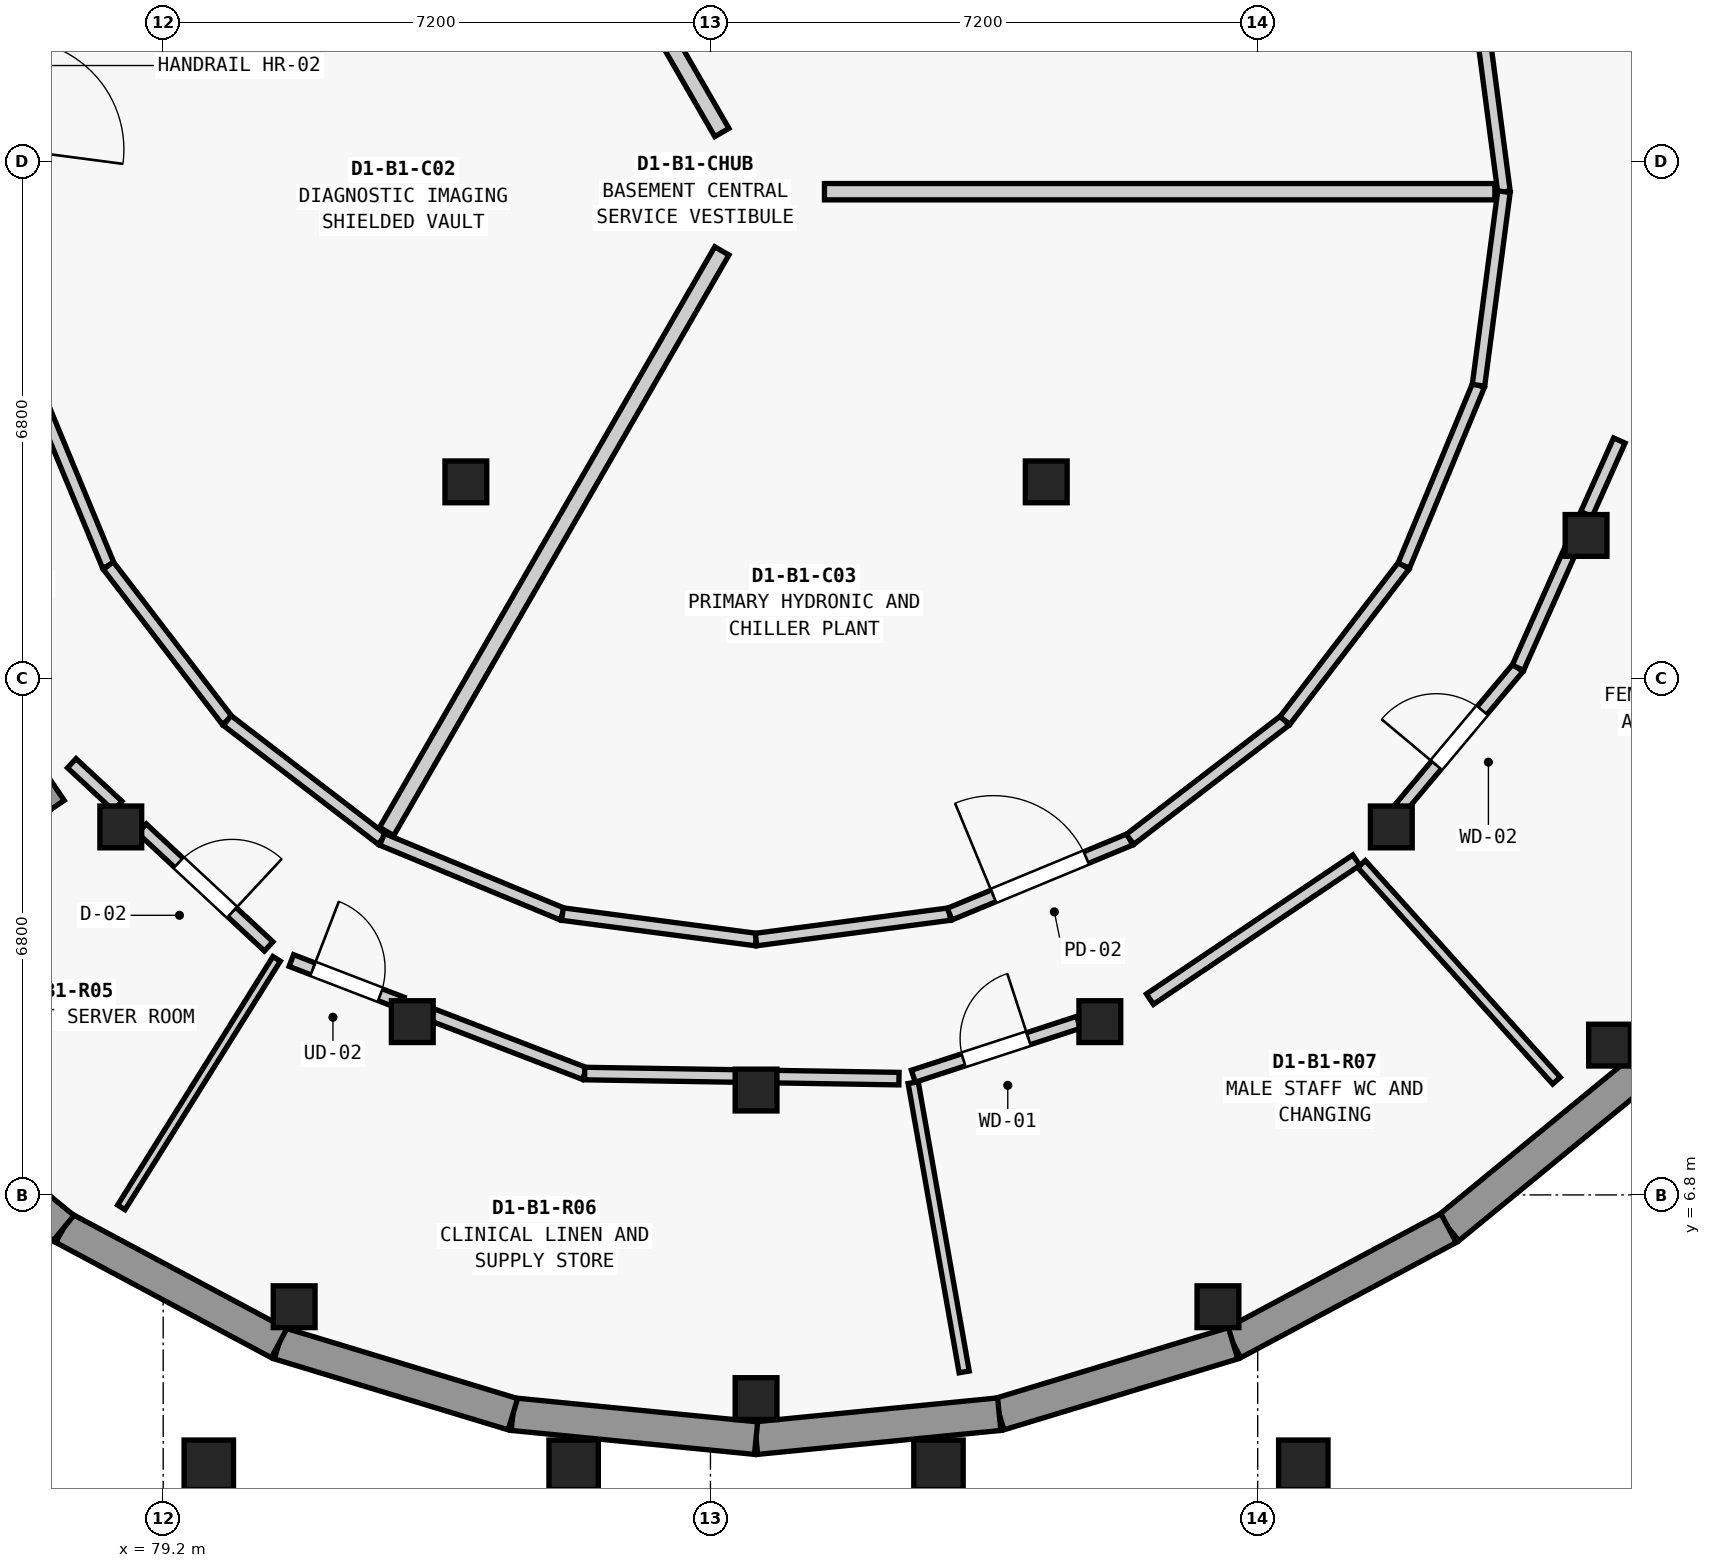
"""IFC4 building model, lengths in metres.
Left out: names, types, materials, properties, quantities, classifications, styles, units other than length and angle.
Written with IfcOpenShell. Run it as: python <this file> out.ifc"""

import sys

from ifc_helpers import new_model, si_unit, direction, frame, frame_2d, origin, origin_2d, place, context, subcontext, project, spatial, rectangle, extrude, element, fill, save


model = new_model("IFC4")
c1 = context("Model", 3, precision=1e-05, world=origin(), true_north=direction((0.0, 1.0)))
c2 = subcontext(c1, "Body", "Model", "MODEL_VIEW")
j1 = project(units=[si_unit("LENGTHUNIT", "METRE"), si_unit("PLANEANGLEUNIT", "RADIAN")], contexts=[c1])
p1 = place(None, origin())
s1 = spatial("IfcSite", under=j1, at=p1, CompositionType="ELEMENT")
p2 = place(p1, origin())
s2 = spatial("IfcBuilding", under=s1, at=p2, CompositionType="ELEMENT")
p3 = place(p2, frame((0.0, 0.0, -4.55)))
s3 = spatial("IfcBuildingStorey", under=s2, at=p3, CompositionType="ELEMENT", Elevation=-4.55)
for number, where, z_axis, x_axis in (
    (1, (80.923, 5.329, 0.0), (0.0, 0.0, 1.0), (1.0, 0.0, 0.0)),
    (2, (87.0, 4.12, 0.0), (0.0, 0.0, 1.0), (1.0, 0.0, 0.0)),
    (3, (93.077, 5.329, 0.0), (0.0, 0.0, 1.0), (1.0, 0.0, 0.0)),
    (4, (98.229, 8.771, 0.0), (0.0, 0.0, 1.0), (1.0, 0.0, 0.0)),
    (5, (78.642, 11.642, 0.0), (0.0, 0.0, 1.0), (1.0, 0.0, 0.0)),
    (6, (82.477, 9.08, 0.0), (0.0, 0.0, 1.0), (1.0, 0.0, 0.0)),
    (7, (87.0, 8.18, 0.0), (0.0, 0.0, 1.0), (1.0, 0.0, 0.0)),
    (8, (91.523, 9.08, 0.0), (0.0, 0.0, 1.0), (1.0, 0.0, 0.0)),
    (9, (95.358, 11.642, 0.0), (0.0, 0.0, 1.0), (1.0, 0.0, 0.0)),
    (10, (97.92, 15.477, 0.0), (0.0, 0.0, 1.0), (1.0, 0.0, 0.0)),
    (11, (83.182, 16.182, 0.0), (0.0, 0.0, 1.0), (1.0, 0.0, 0.0)),
    (12, (90.818, 16.182, 0.0), (0.0, 0.0, 1.0), (1.0, 0.0, 0.0)),
):
    element("IfcColumn", number, at=place(p3, frame(where, z_axis=z_axis, x_axis=x_axis)), inside=s3, PredefinedType="COLUMN", context=c2, shape_type="SweptSolid", body=[
        extrude(rectangle(XDim=0.55, YDim=0.55, at=origin_2d()), origin(), (0.0, 0.0, 1.0), 4.55),
    ])
for number, where, z_axis, x_axis in (
    (13, (79.8, 3.25, 0.0), (0.0, 0.0, 1.0), (1.0, 0.0, 0.0)),
    (14, (84.6, 3.25, 0.0), (0.0, 0.0, 1.0), (1.0, 0.0, 0.0)),
    (15, (89.4, 3.25, 0.0), (0.0, 0.0, 1.0), (1.0, 0.0, 0.0)),
    (16, (94.2, 3.25, 0.0), (0.0, 0.0, 1.0), (1.0, 0.0, 0.0)),
):
    element("IfcColumn", number, at=place(p3, frame(where, z_axis=z_axis, x_axis=x_axis)), inside=s3, PredefinedType="COLUMN", context=c2, shape_type="SweptSolid", body=[
        extrude(rectangle(XDim=0.65, YDim=0.65, at=origin_2d()), origin(), (0.0, 0.0, 1.0), 4.55),
    ])
for number, where, z_axis, x_axis in (
    (17, (100.636, 10.889, 0.0), (0.0, 0.0, 1.0), (-0.634, -0.773, 0.0)),
    (18, (98.597, 8.403, 0.0), (0.0, 0.0, 1.0), (-0.773, -0.634, 0.0)),
    (19, (96.111, 6.364, 0.0), (0.0, 0.0, 1.0), (-0.882, -0.472, 0.0)),
    (20, (93.276, 4.848, 0.0), (0.0, 0.0, 1.0), (-0.957, -0.29, 0.0)),
):
    element("IfcWall", number, at=place(p3, frame(where, z_axis=z_axis, x_axis=x_axis)), inside=s3, PredefinedType="USERDEFINED", context=c2, shape_type="SweptSolid", body=[
        extrude(rectangle(XDim=3.215, YDim=0.43, at=frame_2d((1.607, 0.0))), origin(), (0.0, 0.0, 1.0), 3.335),
    ])
for number, where, z_axis, x_axis in (
    (21, (90.199, 3.915, 0.0), (0.0, 0.0, 1.0), (-0.995, -0.098, 0.0)),
    (22, (87.0, 3.6, 0.0), (0.0, 0.0, 1.0), (-0.995, 0.098, 0.0)),
):
    element("IfcWall", number, at=place(p3, frame(where, z_axis=z_axis, x_axis=x_axis)), inside=s3, PredefinedType="USERDEFINED", context=c2, shape_type="SweptSolid", body=[
        extrude(rectangle(XDim=3.214, YDim=0.43, at=frame_2d((1.607, 0.0))), origin(), (0.0, 0.0, 1.0), 3.335),
    ])
for number, where, z_axis, x_axis in (
    (23, (83.801, 3.915, 0.0), (0.0, 0.0, 1.0), (-0.957, 0.29, 0.0)),
    (24, (80.724, 4.848, 0.0), (0.0, 0.0, 1.0), (-0.882, 0.472, 0.0)),
    (25, (77.889, 6.364, 0.0), (0.0, 0.0, 1.0), (-0.773, 0.634, 0.0)),
):
    element("IfcWall", number, at=place(p3, frame(where, z_axis=z_axis, x_axis=x_axis)), inside=s3, PredefinedType="USERDEFINED", context=c2, shape_type="SweptSolid", body=[
        extrude(rectangle(XDim=3.215, YDim=0.43, at=frame_2d((1.607, 0.0))), origin(), (0.0, 0.0, 1.0), 3.335),
    ])
p4 = place(p3, frame((77.804, 11.928, 0.0), z_axis=(0.0, 0.0, 1.0), x_axis=(-0.559054792443, 0.829130712883, 0.0)))
e26 = element("IfcWall", 26, at=p4, inside=s3, PredefinedType="SHEAR", context=c2, shape_type="SweptSolid", body=[
    extrude(rectangle(XDim=3.1, YDim=0.225, at=frame_2d((1.55, 0.0))), origin(), (0.0, 0.0, 1.0), 4.135),
])
p5 = place(p4, frame((0.9, 0.0, 0.0)))
e27 = element("IfcOpeningElement", 27, at=p5, cuts=e26, PredefinedType="OPENING", context=c2, shape_type="SweptSolid", body=[
    extrude(rectangle(XDim=1.3, YDim=2.2, at=frame_2d((0.65, 1.1))), frame((0.0, 0.123, 0.0), z_axis=(0.0, -1.0, 0.0), x_axis=(1.0, 0.0, 0.0)), (0.0, 0.0, 1.0), 0.245),
])
p6 = place(p3, frame((87.9, 20.0, 0.0), z_axis=(0.0, 0.0, 1.0), x_axis=(1.0, 0.0, 0.0)))
e28 = element("IfcWall", 28, at=p6, inside=s3, PredefinedType="SOLIDWALL", context=c2, shape_type="SweptSolid", body=[
    extrude(rectangle(XDim=8.82, YDim=0.215, at=frame_2d((4.41, 0.0))), origin(), (0.0, 0.0, 1.0), 2.76),
])
for number, where, z_axis, x_axis in (
    (29, (86.55, 20.779, 0.0), (0.0, 0.0, 1.0), (-0.5, 0.866, 0.0)),
    (30, (86.55, 19.221, 0.0), (0.0, 0.0, 1.0), (-0.5, -0.866, 0.0)),
):
    element("IfcWall", number, at=place(p3, frame(where, z_axis=z_axis, x_axis=x_axis)), inside=s3, PredefinedType="SOLIDWALL", context=c2, shape_type="SweptSolid", body=[
        extrude(rectangle(XDim=8.821, YDim=0.215, at=frame_2d((4.41, 0.0))), origin(), (0.0, 0.0, 1.0), 2.76),
    ])
p7 = place(p3, frame((96.84, 20.0, 0.0), z_axis=(0.0, 0.0, 1.0), x_axis=(-0.130476636685, 0.991451384224, 0.0)))
e31 = element("IfcWall", 31, at=p7, inside=s3, PredefinedType="PARTITIONING", context=c2, shape_type="SweptSolid", body=[
    extrude(rectangle(XDim=2.569, YDim=0.165, at=frame_2d((1.285, 0.0))), origin(), (0.0, 0.0, 1.0), 2.76),
])
p8 = place(p3, frame((77.495, 17.453, 0.0), z_axis=(0.0, 0.0, 1.0), x_axis=(0.382704397106, -0.923870848353, 0.0)))
e32 = element("IfcWall", 32, at=p8, inside=s3, PredefinedType="PARTITIONING", context=c2, shape_type="SweptSolid", body=[
    extrude(rectangle(XDim=2.568, YDim=0.165, at=frame_2d((1.284, 0.0))), origin(), (0.0, 0.0, 1.0), 2.76),
])
for number, where, z_axis, x_axis in (
    (33, (78.478, 15.08, 0.0), (0.0, 0.0, 1.0), (0.609, -0.793, 0.0)),
    (34, (80.042, 13.042, 0.0), (0.0, 0.0, 1.0), (0.793, -0.609, 0.0)),
):
    element("IfcWall", number, at=place(p3, frame(where, z_axis=z_axis, x_axis=x_axis)), inside=s3, PredefinedType="PARTITIONING", context=c2, shape_type="SweptSolid", body=[
        extrude(rectangle(XDim=2.569, YDim=0.165, at=frame_2d((1.285, 0.0))), origin(), (0.0, 0.0, 1.0), 2.76),
    ])
p9 = place(p3, frame((82.08, 11.478, 0.0), z_axis=(0.0, 0.0, 1.0), x_axis=(0.923870848353, -0.382704397106, 0.0)))
e35 = element("IfcWall", 35, at=p9, inside=s3, PredefinedType="PARTITIONING", context=c2, shape_type="SweptSolid", body=[
    extrude(rectangle(XDim=2.568, YDim=0.165, at=frame_2d((1.284, 0.0))), origin(), (0.0, 0.0, 1.0), 2.76),
])
for number, where, z_axis, x_axis in (
    (36, (84.453, 10.495, 0.0), (0.0, 0.0, 1.0), (0.991, -0.13, 0.0)),
    (37, (87.0, 10.16, 0.0), (0.0, 0.0, 1.0), (0.991, 0.13, 0.0)),
):
    element("IfcWall", number, at=place(p3, frame(where, z_axis=z_axis, x_axis=x_axis)), inside=s3, PredefinedType="PARTITIONING", context=c2, shape_type="SweptSolid", body=[
        extrude(rectangle(XDim=2.569, YDim=0.165, at=frame_2d((1.285, 0.0))), origin(), (0.0, 0.0, 1.0), 2.76),
    ])
p10 = place(p3, frame((89.547, 10.495, 0.0), z_axis=(0.0, 0.0, 1.0), x_axis=(0.923870848353, 0.382704397106, 0.0)))
e38 = element("IfcWall", 38, at=p10, inside=s3, PredefinedType="PARTITIONING", context=c2, shape_type="SweptSolid", body=[
    extrude(rectangle(XDim=2.568, YDim=0.165, at=frame_2d((1.284, 0.0))), origin(), (0.0, 0.0, 1.0), 2.76),
])
p11 = place(p10, frame((0.624, 0.0, 0.0)))
e39 = element("IfcOpeningElement", 39, at=p11, cuts=e38, PredefinedType="OPENING", context=c2, shape_type="SweptSolid", body=[
    extrude(rectangle(XDim=1.32, YDim=2.24, at=frame_2d((0.66, 1.12))), frame((0.0, 0.093, 0.0), z_axis=(0.0, -1.0, 0.0), x_axis=(1.0, 0.0, 0.0)), (0.0, 0.0, 1.0), 0.185),
])
for number, where, z_axis, x_axis in (
    (40, (91.92, 11.478, 0.0), (0.0, 0.0, 1.0), (0.793, 0.609, 0.0)),
    (41, (93.958, 13.042, 0.0), (0.0, 0.0, 1.0), (0.609, 0.793, 0.0)),
):
    element("IfcWall", number, at=place(p3, frame(where, z_axis=z_axis, x_axis=x_axis)), inside=s3, PredefinedType="PARTITIONING", context=c2, shape_type="SweptSolid", body=[
        extrude(rectangle(XDim=2.569, YDim=0.165, at=frame_2d((1.285, 0.0))), origin(), (0.0, 0.0, 1.0), 2.76),
    ])
p12 = place(p3, frame((95.522, 15.08, 0.0), z_axis=(0.0, 0.0, 1.0), x_axis=(0.382704397106, 0.923870848353, 0.0)))
e42 = element("IfcWall", 42, at=p12, inside=s3, PredefinedType="PARTITIONING", context=c2, shape_type="SweptSolid", body=[
    extrude(rectangle(XDim=2.568, YDim=0.165, at=frame_2d((1.284, 0.0))), origin(), (0.0, 0.0, 1.0), 2.76),
])
p13 = place(p3, frame((96.505, 17.453, 0.0), z_axis=(0.0, 0.0, 1.0), x_axis=(0.130476636685, 0.991451384224, 0.0)))
e43 = element("IfcWall", 43, at=p13, inside=s3, PredefinedType="PARTITIONING", context=c2, shape_type="SweptSolid", body=[
    extrude(rectangle(XDim=2.569, YDim=0.165, at=frame_2d((1.285, 0.0))), origin(), (0.0, 0.0, 1.0), 2.76),
])
p14 = place(p3, frame((80.692, 9.906, 0.0), z_axis=(0.0, 0.0, 1.0), x_axis=(-0.529850951132, -0.848090779094, 0.0)))
e44 = element("IfcWall", 44, at=p14, inside=s3, PredefinedType="PARTITIONING", context=c2, shape_type="SweptSolid", body=[
    extrude(rectangle(XDim=3.856, YDim=0.115, at=frame_2d((1.928, 0.0))), origin(), (0.0, 0.0, 1.0), 2.76),
])
p15 = place(p3, frame((89.067, 8.278, 0.0), z_axis=(0.0, 0.0, 1.0), x_axis=(0.173608798187, -0.984814695865, 0.0)))
e45 = element("IfcWall", 45, at=p15, inside=s3, PredefinedType="PLUMBINGWALL", context=c2, shape_type="SweptSolid", body=[
    extrude(rectangle(XDim=3.866, YDim=0.135, at=frame_2d((1.933, 0.0))), origin(), (0.0, 0.0, 1.0), 2.76),
])
p16 = place(p3, frame((94.965, 11.154, 0.0), z_axis=(0.0, 0.0, 1.0), x_axis=(0.66908430845, -0.74318650969, 0.0)))
e46 = element("IfcWall", 46, at=p16, inside=s3, PredefinedType="PLUMBINGWALL", context=c2, shape_type="SweptSolid", body=[
    extrude(rectangle(XDim=3.835, YDim=0.135, at=frame_2d((1.917, 0.0))), origin(), (0.0, 0.0, 1.0), 2.76),
])
p17 = place(p3, frame((77.997, 12.48, 0.0), z_axis=(0.0, 0.0, 1.0), x_axis=(0.732688002882, -0.680564684973, 0.0)))
e47 = element("IfcWall", 47, at=p17, inside=s3, PredefinedType="PARTITIONING", context=c2, shape_type="SweptSolid", body=[
    extrude(rectangle(XDim=0.824, YDim=0.165, at=frame_2d((0.412, 0.0))), origin(), (0.0, 0.0, 1.0), 2.76),
])
p18 = place(p3, frame((78.921, 11.621, 0.0), z_axis=(0.0, 0.0, 1.0), x_axis=(0.73211336643, -0.681182808572, 0.0)))
e48 = element("IfcWall", 48, at=p18, inside=s3, PredefinedType="PARTITIONING", context=c2, shape_type="SweptSolid", body=[
    extrude(rectangle(XDim=2.277, YDim=0.165, at=frame_2d((1.138, 0.0))), origin(), (0.0, 0.0, 1.0), 2.76),
])
p19 = place(p18, frame((0.659, 0.0, 0.0)))
e49 = element("IfcOpeningElement", 49, at=p19, cuts=e48, PredefinedType="OPENING", context=c2, shape_type="SweptSolid", body=[
    extrude(rectangle(XDim=0.96, YDim=2.12, at=frame_2d((0.48, 1.06))), frame((0.0, 0.093, 0.0), z_axis=(0.0, -1.0, 0.0), x_axis=(1.0, 0.0, 0.0)), (0.0, 0.0, 1.0), 0.185),
])
p20 = place(p3, frame((80.886, 9.884, 0.0), z_axis=(0.0, 0.0, 1.0), x_axis=(0.933175901825, -0.359419999796, 0.0)))
e50 = element("IfcWall", 50, at=p20, inside=s3, PredefinedType="PARTITIONING", context=c2, shape_type="SweptSolid", body=[
    extrude(rectangle(XDim=1.558, YDim=0.165, at=frame_2d((0.779, 0.0))), origin(), (0.0, 0.0, 1.0), 2.76),
])
p21 = place(p20, frame((0.304, 0.0, 0.0)))
e51 = element("IfcOpeningElement", 51, at=p21, cuts=e50, PredefinedType="OPENING", context=c2, shape_type="SweptSolid", body=[
    extrude(rectangle(XDim=0.95, YDim=2.16, at=frame_2d((0.475, 1.08))), frame((0.0, 0.093, 0.0), z_axis=(0.0, -1.0, 0.0), x_axis=(1.0, 0.0, 0.0)), (0.0, 0.0, 1.0), 0.185),
])
p22 = place(p3, frame((82.742, 9.169, 0.0), z_axis=(0.0, 0.0, 1.0), x_axis=(0.933107987924, -0.359596277613, 0.0)))
e52 = element("IfcWall", 52, at=p22, inside=s3, PredefinedType="PARTITIONING", context=c2, shape_type="SweptSolid", body=[
    extrude(rectangle(XDim=2.147, YDim=0.165, at=frame_2d((1.073, 0.0))), origin(), (0.0, 0.0, 1.0), 2.76),
])
p23 = place(p3, frame((84.745, 8.397, 0.0), z_axis=(0.0, 0.0, 1.0), x_axis=(0.999870014647, -0.016123083132, 0.0)))
e53 = element("IfcWall", 53, at=p23, inside=s3, PredefinedType="PARTITIONING", context=c2, shape_type="SweptSolid", body=[
    extrude(rectangle(XDim=2.044, YDim=0.165, at=frame_2d((1.022, 0.0))), origin(), (0.0, 0.0, 1.0), 2.76),
])
p24 = place(p3, frame((87.217, 8.357, 0.0), z_axis=(0.0, 0.0, 1.0), x_axis=(0.999869608685, -0.016148239165, 0.0)))
e54 = element("IfcWall", 54, at=p24, inside=s3, PredefinedType="PARTITIONING", context=c2, shape_type="SweptSolid", body=[
    extrude(rectangle(XDim=1.663, YDim=0.165, at=frame_2d((0.832, 0.0))), origin(), (0.0, 0.0, 1.0), 2.76),
])
p25 = place(p3, frame((89.069, 8.362, 0.0), z_axis=(0.0, 0.0, 1.0), x_axis=(0.950713418435, 0.310070953182, 0.0)))
e55 = element("IfcWall", 55, at=p25, inside=s3, PredefinedType="PARTITIONING", context=c2, shape_type="SweptSolid", body=[
    extrude(rectangle(XDim=2.287, YDim=0.165, at=frame_2d((1.143, 0.0))), origin(), (0.0, 0.0, 1.0), 2.76),
])
p26 = place(p25, frame((0.694, 0.0, 0.0)))
e56 = element("IfcOpeningElement", 56, at=p26, cuts=e55, PredefinedType="OPENING", context=c2, shape_type="SweptSolid", body=[
    extrude(rectangle(XDim=0.9, YDim=2.1, at=frame_2d((0.45, 1.05))), frame((0.0, 0.093, 0.0), z_axis=(0.0, -1.0, 0.0), x_axis=(1.0, 0.0, 0.0)), (0.0, 0.0, 1.0), 0.185),
])
p27 = place(p3, frame((92.182, 9.376, 0.0), z_axis=(0.0, 0.0, 1.0), x_axis=(0.829355825357, 0.558720784423, 0.0)))
e57 = element("IfcWall", 57, at=p27, inside=s3, PredefinedType="PARTITIONING", context=c2, shape_type="SweptSolid", body=[
    extrude(rectangle(XDim=3.274, YDim=0.165, at=frame_2d((1.637, 0.0))), origin(), (0.0, 0.0, 1.0), 2.76),
])
p28 = place(p3, frame((95.48, 11.894, 0.0), z_axis=(0.0, 0.0, 1.0), x_axis=(0.642369860946, 0.766394781916, 0.0)))
e58 = element("IfcWall", 58, at=p28, inside=s3, PredefinedType="PARTITIONING", context=c2, shape_type="SweptSolid", body=[
    extrude(rectangle(XDim=2.404, YDim=0.165, at=frame_2d((1.202, 0.0))), origin(), (0.0, 0.0, 1.0), 2.76),
])
p29 = place(p28, frame((0.732, 0.0, 0.0)))
e59 = element("IfcOpeningElement", 59, at=p29, cuts=e58, PredefinedType="OPENING", context=c2, shape_type="SweptSolid", body=[
    extrude(rectangle(XDim=0.94, YDim=2.1, at=frame_2d((0.47, 1.05))), frame((0.0, 0.093, 0.0), z_axis=(0.0, -1.0, 0.0), x_axis=(1.0, 0.0, 0.0)), (0.0, 0.0, 1.0), 0.185),
])
p30 = place(p3, frame((97.024, 13.736, 0.0), z_axis=(0.0, 0.0, 1.0), x_axis=(0.407299490474, 0.913294654019, 0.0)))
e60 = element("IfcWall", 60, at=p30, inside=s3, PredefinedType="PARTITIONING", context=c2, shape_type="SweptSolid", body=[
    extrude(rectangle(XDim=1.697, YDim=0.165, at=frame_2d((0.849, 0.0))), origin(), (0.0, 0.0, 1.0), 2.76),
])
p31 = place(p3, frame((97.925, 15.757, 0.0), z_axis=(0.0, 0.0, 1.0), x_axis=(0.407866620659, 0.913041521374, 0.0)))
e61 = element("IfcWall", 61, at=p31, inside=s3, PredefinedType="PARTITIONING", context=c2, shape_type="SweptSolid", body=[
    extrude(rectangle(XDim=1.061, YDim=0.165, at=frame_2d((0.531, 0.0))), origin(), (0.0, 0.0, 1.0), 2.76),
])
p32 = place(p11, origin())
e62 = element("IfcDoor", 62, at=p32, inside=s3, OperationType="SINGLE_SWING_LEFT", PredefinedType="DOOR", context=c2, shape_type="SweptSolid", body=[
    extrude(rectangle(XDim=1.32, YDim=2.24, at=frame_2d((0.66, 1.12))), frame((0.0, 0.025, 0.0), z_axis=(0.0, -1.0, 0.0), x_axis=(1.0, 0.0, 0.0)), (0.0, 0.0, 1.0), 0.05),
])
fill(e39, e62)
p33 = place(p19, origin())
e63 = element("IfcDoor", 63, at=p33, inside=s3, OperationType="SINGLE_SWING_RIGHT", PredefinedType="DOOR", context=c2, shape_type="SweptSolid", body=[
    extrude(rectangle(XDim=0.96, YDim=2.12, at=frame_2d((0.48, 1.06))), frame((0.0, 0.025, 0.0), z_axis=(0.0, -1.0, 0.0), x_axis=(1.0, 0.0, 0.0)), (0.0, 0.0, 1.0), 0.05),
])
fill(e49, e63)
p34 = place(p21, origin())
e64 = element("IfcDoor", 64, at=p34, inside=s3, OperationType="SINGLE_SWING_LEFT", PredefinedType="DOOR", context=c2, shape_type="SweptSolid", body=[
    extrude(rectangle(XDim=0.95, YDim=2.16, at=frame_2d((0.475, 1.08))), frame((0.0, 0.025, 0.0), z_axis=(0.0, -1.0, 0.0), x_axis=(1.0, 0.0, 0.0)), (0.0, 0.0, 1.0), 0.05),
])
fill(e51, e64)
p35 = place(p26, origin())
e65 = element("IfcDoor", 65, at=p35, inside=s3, OperationType="SINGLE_SWING_RIGHT", PredefinedType="DOOR", context=c2, shape_type="SweptSolid", body=[
    extrude(rectangle(XDim=0.9, YDim=2.1, at=frame_2d((0.45, 1.05))), frame((0.0, 0.025, 0.0), z_axis=(0.0, -1.0, 0.0), x_axis=(1.0, 0.0, 0.0)), (0.0, 0.0, 1.0), 0.05),
])
fill(e56, e65)
p36 = place(p29, origin())
e66 = element("IfcDoor", 66, at=p36, inside=s3, OperationType="SINGLE_SWING_LEFT", PredefinedType="DOOR", context=c2, shape_type="SweptSolid", body=[
    extrude(rectangle(XDim=0.94, YDim=2.1, at=frame_2d((0.47, 1.05))), frame((0.0, 0.025, 0.0), z_axis=(0.0, -1.0, 0.0), x_axis=(1.0, 0.0, 0.0)), (0.0, 0.0, 1.0), 0.05),
])
fill(e59, e66)
save(model, sys.argv[1])
